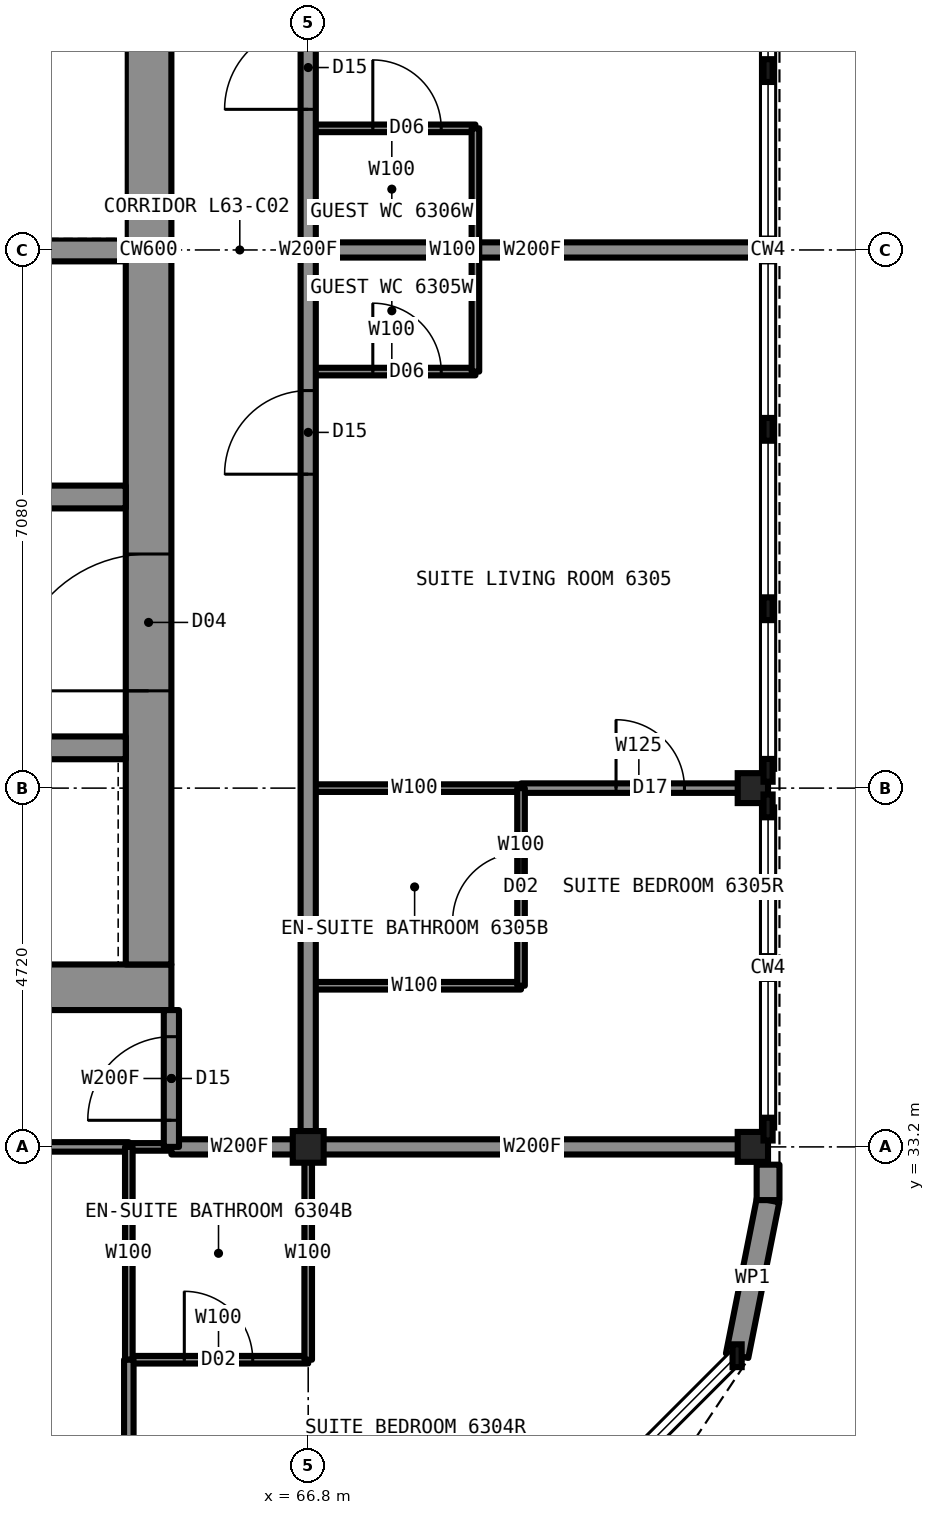
"""IFC4 building model, lengths in metres.
Left out: names, types, materials, properties, quantities, classifications, styles, units other than length and angle.
Written with IfcOpenShell. Run it as: python <this file> out.ifc"""

import sys

from ifc_helpers import new_model, si_unit, direction, frame, frame_2d, origin, origin_2d, place, context, subcontext, project, spatial, rectangle, i_section, extrude, element, fill, save


model = new_model("IFC4")
c1 = context("Model", 3, precision=1e-05, world=origin(), true_north=direction((0.0, 1.0)))
c2 = subcontext(c1, "Body", "Model", "MODEL_VIEW")
j1 = project(units=[si_unit("LENGTHUNIT", "METRE"), si_unit("PLANEANGLEUNIT", "RADIAN")], contexts=[c1])
p1 = place(None, origin())
s1 = spatial("IfcSite", under=j1, at=p1, CompositionType="ELEMENT")
p2 = place(p1, origin())
s2 = spatial("IfcBuilding", under=s1, at=p2, CompositionType="ELEMENT")
p3 = place(p2, frame((0.0, 0.0, 226.7)))
s3 = spatial("IfcBuildingStorey", under=s2, at=p3, CompositionType="ELEMENT", Elevation=226.7)
for number, where, z_axis, x_axis in (
    (1, (72.65, 33.2, 0.0), (0.0, 0.0, 1.0), (1.0, 0.0, 0.0)),
    (2, (72.65, 37.92, 0.0), (0.0, 0.0, 1.0), (1.0, 0.0, 0.0)),
):
    element("IfcColumn", number, at=place(p3, frame(where, z_axis=z_axis, x_axis=x_axis)), inside=s3, PredefinedType="COLUMN", context=c2, shape_type="SweptSolid", body=[
        extrude(i_section(OverallWidth=0.442, OverallDepth=0.531, WebThickness=0.066, FlangeThickness=0.106, at=origin_2d()), origin(), (0.0, 0.0, 1.0), 3.5),
    ])
p4 = place(p3, frame((66.8, 33.2, 0.0), z_axis=(0.0, 0.0, 1.0), x_axis=(1.0, 0.0, 0.0)))
e3 = element("IfcColumn", 3, at=p4, inside=s3, PredefinedType="COLUMN", context=c2, shape_type="SweptSolid", body=[
    extrude(i_section(OverallWidth=0.406, OverallDepth=0.417, WebThickness=0.03, FlangeThickness=0.048, at=origin_2d()), origin(), (0.0, 0.0, 1.0), 3.5),
])
p5 = place(p3, frame((45.0, 35.3, 0.0), z_axis=(0.0, 0.0, 1.0), x_axis=(1.0, 0.0, 0.0)))
e4 = element("IfcWall", 4, at=p5, inside=s3, PredefinedType="SHEAR", context=c2, shape_type="SweptSolid", body=[
    extrude(rectangle(XDim=20.0, YDim=0.6, at=frame_2d((10.0, 0.0))), origin(), (0.0, 0.0, 1.0), 3.5),
])
p6 = place(p3, frame((64.7, 35.6, 0.0), z_axis=(0.0, 0.0, 1.0), x_axis=(0.0, 1.0, 0.0)))
e5 = element("IfcWall", 5, at=p6, inside=s3, PredefinedType="SHEAR", context=c2, shape_type="SweptSolid", body=[
    extrude(rectangle(XDim=18.8, YDim=0.6, at=frame_2d((9.4, 0.0))), origin(), (0.0, 0.0, 1.0), 3.5),
])
p7 = place(p6, frame((13.4, 0.0, 0.0)))
e6 = element("IfcOpeningElement", 6, at=p7, cuts=e5, PredefinedType="OPENING", context=c2, shape_type="SweptSolid", body=[
    extrude(rectangle(XDim=1.8, YDim=2.2, at=frame_2d((0.9, 1.1))), frame((0.0, 0.31, 0.0), z_axis=(0.0, -1.0, 0.0), x_axis=(1.0, 0.0, 0.0)), (0.0, 0.0, 1.0), 0.62),
])
p8 = place(p6, frame((3.6, 0.0, 0.0)))
e7 = element("IfcOpeningElement", 7, at=p8, cuts=e5, PredefinedType="OPENING", context=c2, shape_type="SweptSolid", body=[
    extrude(rectangle(XDim=1.8, YDim=2.2, at=frame_2d((0.9, 1.1))), frame((0.0, 0.31, 0.0), z_axis=(0.0, -1.0, 0.0), x_axis=(1.0, 0.0, 0.0)), (0.0, 0.0, 1.0), 0.62),
])
p9 = place(p3, frame((45.6, 38.45, 0.0), z_axis=(0.0, 0.0, 1.0), x_axis=(1.0, 0.0, 0.0)))
e8 = element("IfcWall", 8, at=p9, inside=s3, PredefinedType="SHEAR", context=c2, shape_type="SweptSolid", body=[
    extrude(rectangle(XDim=18.8, YDim=0.3, at=frame_2d((9.4, 0.0))), origin(), (0.0, 0.0, 1.0), 3.5),
])
p10 = place(p9, frame((0.7, 0.0, 0.0)))
e9 = element("IfcOpeningElement", 9, at=p10, cuts=e8, PredefinedType="OPENING", context=c2, shape_type="SweptSolid", body=[
    extrude(rectangle(XDim=1.1, YDim=2.2, at=frame_2d((0.55, 1.1))), frame((0.0, 0.16, 0.0), z_axis=(0.0, -1.0, 0.0), x_axis=(1.0, 0.0, 0.0)), (0.0, 0.0, 1.0), 0.32),
])
p11 = place(p9, frame((3.4, 0.0, 0.0)))
e10 = element("IfcOpeningElement", 10, at=p11, cuts=e8, PredefinedType="OPENING", context=c2, shape_type="SweptSolid", body=[
    extrude(rectangle(XDim=1.1, YDim=2.2, at=frame_2d((0.55, 1.1))), frame((0.0, 0.16, 0.0), z_axis=(0.0, -1.0, 0.0), x_axis=(1.0, 0.0, 0.0)), (0.0, 0.0, 1.0), 0.32),
])
p12 = place(p9, frame((6.1, 0.0, 0.0)))
e11 = element("IfcOpeningElement", 11, at=p12, cuts=e8, PredefinedType="OPENING", context=c2, shape_type="SweptSolid", body=[
    extrude(rectangle(XDim=1.1, YDim=2.2, at=frame_2d((0.55, 1.1))), frame((0.0, 0.16, 0.0), z_axis=(0.0, -1.0, 0.0), x_axis=(1.0, 0.0, 0.0)), (0.0, 0.0, 1.0), 0.32),
])
p13 = place(p9, frame((8.8, 0.0, 0.0)))
e12 = element("IfcOpeningElement", 12, at=p13, cuts=e8, PredefinedType="OPENING", context=c2, shape_type="SweptSolid", body=[
    extrude(rectangle(XDim=1.1, YDim=2.2, at=frame_2d((0.55, 1.1))), frame((0.0, 0.16, 0.0), z_axis=(0.0, -1.0, 0.0), x_axis=(1.0, 0.0, 0.0)), (0.0, 0.0, 1.0), 0.32),
])
p14 = place(p3, frame((56.2, 41.75, 0.0), z_axis=(0.0, 0.0, 1.0), x_axis=(1.0, 0.0, 0.0)))
e13 = element("IfcWall", 13, at=p14, inside=s3, PredefinedType="SHEAR", context=c2, shape_type="SweptSolid", body=[
    extrude(rectangle(XDim=8.2, YDim=0.3, at=frame_2d((4.1, 0.0))), origin(), (0.0, 0.0, 1.0), 3.5),
])
p15 = place(p14, frame((3.3, 0.0, 0.0)))
e14 = element("IfcOpeningElement", 14, at=p15, cuts=e13, PredefinedType="OPENING", context=c2, shape_type="SweptSolid", body=[
    extrude(rectangle(XDim=1.0, YDim=2.1, at=frame_2d((0.5, 1.05))), frame((0.0, 0.16, 0.0), z_axis=(0.0, -1.0, 0.0), x_axis=(1.0, 0.0, 0.0)), (0.0, 0.0, 1.0), 0.32),
])
p16 = place(p3, frame((56.5, 45.0, 0.0), z_axis=(0.0, 0.0, 1.0), x_axis=(1.0, 0.0, 0.0)))
e15 = element("IfcWall", 15, at=p16, inside=s3, PredefinedType="SHEAR", context=c2, shape_type="SweptSolid", body=[
    extrude(rectangle(XDim=7.9, YDim=0.3, at=frame_2d((3.95, 0.0))), origin(), (0.0, 0.0, 1.0), 3.5),
])
p17 = place(p3, frame((66.8, 43.4, 0.0), z_axis=(0.0, 0.0, 1.0), x_axis=(1.0, 0.0, 0.0)))
e16 = element("IfcWall", 16, at=p17, inside=s3, PredefinedType="PARTITIONING", context=c2, shape_type="SweptSolid", body=[
    extrude(rectangle(XDim=2.2, YDim=0.1, at=frame_2d((1.1, 0.0))), origin(), (0.0, 0.0, 1.0), 3.33),
])
p18 = place(p17, frame((0.85, 0.0, 0.0)))
e17 = element("IfcOpeningElement", 17, at=p18, cuts=e16, PredefinedType="OPENING", context=c2, shape_type="SweptSolid", body=[
    extrude(rectangle(XDim=0.9, YDim=2.1, at=frame_2d((0.45, 1.05))), frame((0.0, 0.06, 0.0), z_axis=(0.0, -1.0, 0.0), x_axis=(1.0, 0.0, 0.0)), (0.0, 0.0, 1.0), 0.12),
])
p19 = place(p3, frame((64.44, 33.2, 0.0), z_axis=(0.0, 0.0, 1.0), x_axis=(1.0, 0.0, 0.0)))
e18 = element("IfcWall", 18, at=p19, inside=s3, PredefinedType="PARTITIONING", context=c2, shape_type="SweptSolid", body=[
    extrude(rectangle(XDim=0.56, YDim=0.1, at=frame_2d((0.28, 0.0))), origin(), (0.0, 0.0, 1.0), 3.33),
])
p20 = place(p3, frame((65.0, 33.2, 0.0), z_axis=(0.0, 0.0, 1.0), x_axis=(1.0, 0.0, 0.0)))
e19 = element("IfcWall", 19, at=p20, inside=s3, PredefinedType="PARTITIONING", context=c2, shape_type="SweptSolid", body=[
    extrude(rectangle(XDim=1.8, YDim=0.2, at=frame_2d((0.9, 0.0))), origin(), (0.0, 0.0, 1.0), 3.33),
])
p21 = place(p3, frame((66.8, 33.2, 0.0), z_axis=(0.0, 0.0, 1.0), x_axis=(1.0, 0.0, 0.0)))
e20 = element("IfcWall", 20, at=p21, inside=s3, PredefinedType="PARTITIONING", context=c2, shape_type="SweptSolid", body=[
    extrude(rectangle(XDim=5.9, YDim=0.2, at=frame_2d((2.95, 0.0))), origin(), (0.0, 0.0, 1.0), 2.573),
])
p22 = place(p3, frame((56.6, 33.2, 0.0), z_axis=(0.0, 0.0, 1.0), x_axis=(1.0, 0.0, 0.0)))
e21 = element("IfcWall", 21, at=p22, inside=s3, PredefinedType="PARTITIONING", context=c2, shape_type="SweptSolid", body=[
    extrude(rectangle(XDim=7.84, YDim=0.125, at=frame_2d((3.92, 0.0))), origin(), (0.0, 0.0, 1.0), 3.33),
])
p23 = place(p22, frame((3.45, 0.0, 0.0)))
e22 = element("IfcOpeningElement", 22, at=p23, cuts=e21, PredefinedType="OPENING", context=c2, shape_type="SweptSolid", body=[
    extrude(rectangle(XDim=0.9, YDim=2.2, at=frame_2d((0.45, 1.1))), frame((0.0, 0.073, 0.0), z_axis=(0.0, -1.0, 0.0), x_axis=(1.0, 0.0, 0.0)), (0.0, 0.0, 1.0), 0.145),
])
p24 = place(p3, frame((64.44, 30.4, 0.0), z_axis=(0.0, 0.0, 1.0), x_axis=(1.0, 0.0, 0.0)))
e23 = element("IfcWall", 23, at=p24, inside=s3, PredefinedType="PARTITIONING", context=c2, shape_type="SweptSolid", body=[
    extrude(rectangle(XDim=2.36, YDim=0.1, at=frame_2d((1.18, 0.0))), origin(), (0.0, 0.0, 1.0), 3.33),
])
p25 = place(p24, frame((0.73, 0.0, 0.0)))
e24 = element("IfcOpeningElement", 24, at=p25, cuts=e23, PredefinedType="OPENING", context=c2, shape_type="SweptSolid", body=[
    extrude(rectangle(XDim=0.9, YDim=2.1, at=frame_2d((0.45, 1.05))), frame((0.0, 0.06, 0.0), z_axis=(0.0, -1.0, 0.0), x_axis=(1.0, 0.0, 0.0)), (0.0, 0.0, 1.0), 0.12),
])
p26 = place(p3, frame((66.8, 37.92, 0.0), z_axis=(0.0, 0.0, 1.0), x_axis=(1.0, 0.0, 0.0)))
e25 = element("IfcWall", 25, at=p26, inside=s3, PredefinedType="PARTITIONING", context=c2, shape_type="SweptSolid", body=[
    extrude(rectangle(XDim=2.8, YDim=0.1, at=frame_2d((1.4, 0.0))), origin(), (0.0, 0.0, 1.0), 2.573),
])
p27 = place(p3, frame((69.6, 37.92, 0.0), z_axis=(0.0, 0.0, 1.0), x_axis=(1.0, 0.0, 0.0)))
e26 = element("IfcWall", 26, at=p27, inside=s3, PredefinedType="PARTITIONING", context=c2, shape_type="SweptSolid", body=[
    extrude(rectangle(XDim=3.1, YDim=0.125, at=frame_2d((1.55, 0.0))), origin(), (0.0, 0.0, 1.0), 2.573),
])
p28 = place(p27, frame((1.25, 0.0, 0.0)))
e27 = element("IfcOpeningElement", 27, at=p28, cuts=e26, PredefinedType="OPENING", context=c2, shape_type="SweptSolid", body=[
    extrude(rectangle(XDim=0.9, YDim=2.2, at=frame_2d((0.45, 1.1))), frame((0.0, 0.073, 0.0), z_axis=(0.0, -1.0, 0.0), x_axis=(1.0, 0.0, 0.0)), (0.0, 0.0, 1.0), 0.145),
])
p29 = place(p3, frame((66.8, 35.32, 0.0), z_axis=(0.0, 0.0, 1.0), x_axis=(1.0, 0.0, 0.0)))
e28 = element("IfcWall", 28, at=p29, inside=s3, PredefinedType="PARTITIONING", context=c2, shape_type="SweptSolid", body=[
    extrude(rectangle(XDim=2.8, YDim=0.1, at=frame_2d((1.4, 0.0))), origin(), (0.0, 0.0, 1.0), 3.33),
])
p30 = place(p3, frame((66.8, 45.0, 0.0), z_axis=(0.0, 0.0, 1.0), x_axis=(1.0, 0.0, 0.0)))
e29 = element("IfcWall", 29, at=p30, inside=s3, PredefinedType="PARTITIONING", context=c2, shape_type="SweptSolid", body=[
    extrude(rectangle(XDim=5.9, YDim=0.2, at=frame_2d((2.95, 0.0))), origin(), (0.0, 0.0, 1.0), 2.797),
])
p31 = place(p3, frame((66.8, 46.6, 0.0), z_axis=(0.0, 0.0, 1.0), x_axis=(1.0, 0.0, 0.0)))
e30 = element("IfcWall", 30, at=p31, inside=s3, PredefinedType="PARTITIONING", context=c2, shape_type="SweptSolid", body=[
    extrude(rectangle(XDim=2.2, YDim=0.1, at=frame_2d((1.1, 0.0))), origin(), (0.0, 0.0, 1.0), 3.33),
])
p32 = place(p31, frame((0.85, 0.0, 0.0)))
e31 = element("IfcOpeningElement", 31, at=p32, cuts=e30, PredefinedType="OPENING", context=c2, shape_type="SweptSolid", body=[
    extrude(rectangle(XDim=0.9, YDim=2.1, at=frame_2d((0.45, 1.05))), frame((0.0, 0.06, 0.0), z_axis=(0.0, -1.0, 0.0), x_axis=(1.0, 0.0, 0.0)), (0.0, 0.0, 1.0), 0.12),
])
p33 = place(p3, frame((65.0, 33.2, 0.0), z_axis=(0.0, 0.0, 1.0), x_axis=(0.0, 1.0, 0.0)))
e32 = element("IfcWall", 32, at=p33, inside=s3, PredefinedType="PARTITIONING", context=c2, shape_type="SweptSolid", body=[
    extrude(rectangle(XDim=1.8, YDim=0.2, at=frame_2d((0.9, 0.0))), origin(), (0.0, 0.0, 1.0), 3.33),
])
p34 = place(p33, frame((0.35, 0.0, 0.0)))
e33 = element("IfcOpeningElement", 33, at=p34, cuts=e32, PredefinedType="OPENING", context=c2, shape_type="SweptSolid", body=[
    extrude(rectangle(XDim=1.1, YDim=2.2, at=frame_2d((0.55, 1.1))), frame((0.0, 0.11, 0.0), z_axis=(0.0, -1.0, 0.0), x_axis=(1.0, 0.0, 0.0)), (0.0, 0.0, 1.0), 0.22),
])
p35 = place(p3, frame((66.8, 30.4, 0.0), z_axis=(0.0, 0.0, 1.0), x_axis=(0.0, 1.0, 0.0)))
e34 = element("IfcWall", 34, at=p35, inside=s3, PredefinedType="PARTITIONING", context=c2, shape_type="SweptSolid", body=[
    extrude(rectangle(XDim=2.8, YDim=0.1, at=frame_2d((1.4, 0.0))), origin(), (0.0, 0.0, 1.0), 2.573),
])
p36 = place(p3, frame((66.8, 33.2, 0.0), z_axis=(0.0, 0.0, 1.0), x_axis=(0.0, 1.0, 0.0)))
e35 = element("IfcWall", 35, at=p36, inside=s3, PredefinedType="PARTITIONING", context=c2, shape_type="SweptSolid", body=[
    extrude(rectangle(XDim=23.6, YDim=0.2, at=frame_2d((11.8, 0.0))), origin(), (0.0, 0.0, 1.0), 3.33),
])
p37 = place(p36, frame((8.85, 0.0, 0.0)))
e36 = element("IfcOpeningElement", 36, at=p37, cuts=e35, PredefinedType="OPENING", context=c2, shape_type="SweptSolid", body=[
    extrude(rectangle(XDim=1.1, YDim=2.2, at=frame_2d((0.55, 1.1))), frame((0.0, 0.11, 0.0), z_axis=(0.0, -1.0, 0.0), x_axis=(1.0, 0.0, 0.0)), (0.0, 0.0, 1.0), 0.22),
])
p38 = place(p36, frame((13.65, 0.0, 0.0)))
e37 = element("IfcOpeningElement", 37, at=p38, cuts=e35, PredefinedType="OPENING", context=c2, shape_type="SweptSolid", body=[
    extrude(rectangle(XDim=1.1, YDim=2.2, at=frame_2d((0.55, 1.1))), frame((0.0, 0.11, 0.0), z_axis=(0.0, -1.0, 0.0), x_axis=(1.0, 0.0, 0.0)), (0.0, 0.0, 1.0), 0.22),
])
p39 = place(p3, frame((69.0, 43.4, 0.0), z_axis=(0.0, 0.0, 1.0), x_axis=(0.0, 1.0, 0.0)))
e38 = element("IfcWall", 38, at=p39, inside=s3, PredefinedType="PARTITIONING", context=c2, shape_type="SweptSolid", body=[
    extrude(rectangle(XDim=3.2, YDim=0.1, at=frame_2d((1.6, 0.0))), origin(), (0.0, 0.0, 1.0), 3.33),
])
p40 = place(p3, frame((69.6, 35.32, 0.0), z_axis=(0.0, 0.0, 1.0), x_axis=(0.0, 1.0, 0.0)))
e39 = element("IfcWall", 39, at=p40, inside=s3, PredefinedType="PARTITIONING", context=c2, shape_type="SweptSolid", body=[
    extrude(rectangle(XDim=2.6, YDim=0.1, at=frame_2d((1.3, 0.0))), origin(), (0.0, 0.0, 1.0), 3.33),
])
p41 = place(p40, frame((0.85, 0.0, 0.0)))
e40 = element("IfcOpeningElement", 40, at=p41, cuts=e39, PredefinedType="OPENING", context=c2, shape_type="SweptSolid", body=[
    extrude(rectangle(XDim=0.9, YDim=2.1, at=frame_2d((0.45, 1.05))), frame((0.0, 0.06, 0.0), z_axis=(0.0, -1.0, 0.0), x_axis=(1.0, 0.0, 0.0)), (0.0, 0.0, 1.0), 0.12),
])
p42 = place(p3, frame((64.44, 30.4, 0.0), z_axis=(0.0, 0.0, 1.0), x_axis=(0.0, 1.0, 0.0)))
e41 = element("IfcWall", 41, at=p42, inside=s3, PredefinedType="PARTITIONING", context=c2, shape_type="SweptSolid", body=[
    extrude(rectangle(XDim=2.8, YDim=0.1, at=frame_2d((1.4, 0.0))), origin(), (0.0, 0.0, 1.0), 3.33),
])
p43 = place(p3, frame((64.44, 27.3, 0.0), z_axis=(0.0, 0.0, 1.0), x_axis=(0.0, 1.0, 0.0)))
e42 = element("IfcWall", 42, at=p43, inside=s3, PredefinedType="PARTITIONING", context=c2, shape_type="SweptSolid", body=[
    extrude(rectangle(XDim=3.1, YDim=0.125, at=frame_2d((1.55, 0.0))), origin(), (0.0, 0.0, 1.0), 3.33),
])
p44 = place(p43, frame((0.95, 0.0, 0.0)))
e43 = element("IfcOpeningElement", 43, at=p44, cuts=e42, PredefinedType="OPENING", context=c2, shape_type="SweptSolid", body=[
    extrude(rectangle(XDim=0.9, YDim=2.2, at=frame_2d((0.45, 1.1))), frame((0.0, 0.073, 0.0), z_axis=(0.0, -1.0, 0.0), x_axis=(1.0, 0.0, 0.0)), (0.0, 0.0, 1.0), 0.145),
])
p45 = place(p3, frame((71.283, 28.717, 0.0), z_axis=(0.0, 0.0, 1.0), x_axis=(0.555644460423, 0.831420010345, 0.0)))
e44 = element("IfcWall", 44, at=p45, inside=s3, PredefinedType="SOLIDWALL", context=c2, shape_type="SweptSolid", body=[
    extrude(rectangle(XDim=2.087, YDim=0.3, at=frame_2d((1.044, 0.0))), origin(), (0.0, 0.0, 1.0), 2.83),
])
p46 = place(p25, origin())
e45 = element("IfcDoor", 45, at=p46, inside=s3, OperationType="SINGLE_SWING_RIGHT", PredefinedType="DOOR", context=c2, shape_type="SweptSolid", body=[
    extrude(rectangle(XDim=0.9, YDim=2.1, at=frame_2d((0.45, 1.05))), frame((0.0, 0.025, 0.0), z_axis=(0.0, -1.0, 0.0), x_axis=(1.0, 0.0, 0.0)), (0.0, 0.0, 1.0), 0.05),
])
fill(e24, e45)
p47 = place(p34, origin())
e46 = element("IfcDoor", 46, at=p47, inside=s3, OperationType="SINGLE_SWING_LEFT", PredefinedType="DOOR", context=c2, shape_type="SweptSolid", body=[
    extrude(rectangle(XDim=1.1, YDim=2.2, at=frame_2d((0.55, 1.1))), frame((0.0, 0.025, 0.0), z_axis=(0.0, -1.0, 0.0), x_axis=(1.0, 0.0, 0.0)), (0.0, 0.0, 1.0), 0.05),
])
fill(e33, e46)
p48 = place(p37, origin())
e47 = element("IfcDoor", 47, at=p48, inside=s3, OperationType="SINGLE_SWING_LEFT", PredefinedType="DOOR", context=c2, shape_type="SweptSolid", body=[
    extrude(rectangle(XDim=1.1, YDim=2.2, at=frame_2d((0.55, 1.1))), frame((0.0, 0.025, 0.0), z_axis=(0.0, -1.0, 0.0), x_axis=(1.0, 0.0, 0.0)), (0.0, 0.0, 1.0), 0.05),
])
fill(e36, e47)
p49 = place(p41, origin())
e48 = element("IfcDoor", 48, at=p49, inside=s3, OperationType="SINGLE_SWING_RIGHT", PredefinedType="DOOR", context=c2, shape_type="SweptSolid", body=[
    extrude(rectangle(XDim=0.9, YDim=2.1, at=frame_2d((0.45, 1.05))), frame((0.0, 0.025, 0.0), z_axis=(0.0, -1.0, 0.0), x_axis=(1.0, 0.0, 0.0)), (0.0, 0.0, 1.0), 0.05),
])
fill(e40, e48)
p50 = place(p28, origin())
e49 = element("IfcDoor", 49, at=p50, inside=s3, OperationType="SINGLE_SWING_LEFT", PredefinedType="DOOR", context=c2, shape_type="SweptSolid", body=[
    extrude(rectangle(XDim=0.9, YDim=2.2, at=frame_2d((0.45, 1.1))), frame((0.0, 0.025, 0.0), z_axis=(0.0, -1.0, 0.0), x_axis=(1.0, 0.0, 0.0)), (0.0, 0.0, 1.0), 0.05),
])
fill(e27, e49)
p51 = place(p18, origin())
e50 = element("IfcDoor", 50, at=p51, inside=s3, OperationType="SINGLE_SWING_LEFT", PredefinedType="DOOR", context=c2, shape_type="SweptSolid", body=[
    extrude(rectangle(XDim=0.9, YDim=2.1, at=frame_2d((0.45, 1.05))), frame((0.0, 0.025, 0.0), z_axis=(0.0, -1.0, 0.0), x_axis=(1.0, 0.0, 0.0)), (0.0, 0.0, 1.0), 0.05),
])
fill(e17, e50)
p52 = place(p38, origin())
e51 = element("IfcDoor", 51, at=p52, inside=s3, OperationType="SINGLE_SWING_LEFT", PredefinedType="DOOR", context=c2, shape_type="SweptSolid", body=[
    extrude(rectangle(XDim=1.1, YDim=2.2, at=frame_2d((0.55, 1.1))), frame((0.0, 0.025, 0.0), z_axis=(0.0, -1.0, 0.0), x_axis=(1.0, 0.0, 0.0)), (0.0, 0.0, 1.0), 0.05),
])
fill(e37, e51)
p53 = place(p32, origin())
e52 = element("IfcDoor", 52, at=p53, inside=s3, OperationType="SINGLE_SWING_LEFT", PredefinedType="DOOR", context=c2, shape_type="SweptSolid", body=[
    extrude(rectangle(XDim=0.9, YDim=2.1, at=frame_2d((0.45, 1.05))), frame((0.0, 0.025, 0.0), z_axis=(0.0, -1.0, 0.0), x_axis=(1.0, 0.0, 0.0)), (0.0, 0.0, 1.0), 0.05),
])
fill(e31, e52)
p54 = place(p8, origin())
e53 = element("IfcDoor", 53, at=p54, inside=s3, OperationType="DOUBLE_DOOR_SINGLE_SWING", PredefinedType="DOOR", context=c2, shape_type="SweptSolid", body=[
    extrude(rectangle(XDim=1.8, YDim=2.2, at=frame_2d((0.9, 1.1))), frame((0.0, 0.025, 0.0), z_axis=(0.0, -1.0, 0.0), x_axis=(1.0, 0.0, 0.0)), (0.0, 0.0, 1.0), 0.05),
])
fill(e7, e53)
save(model, sys.argv[1])
